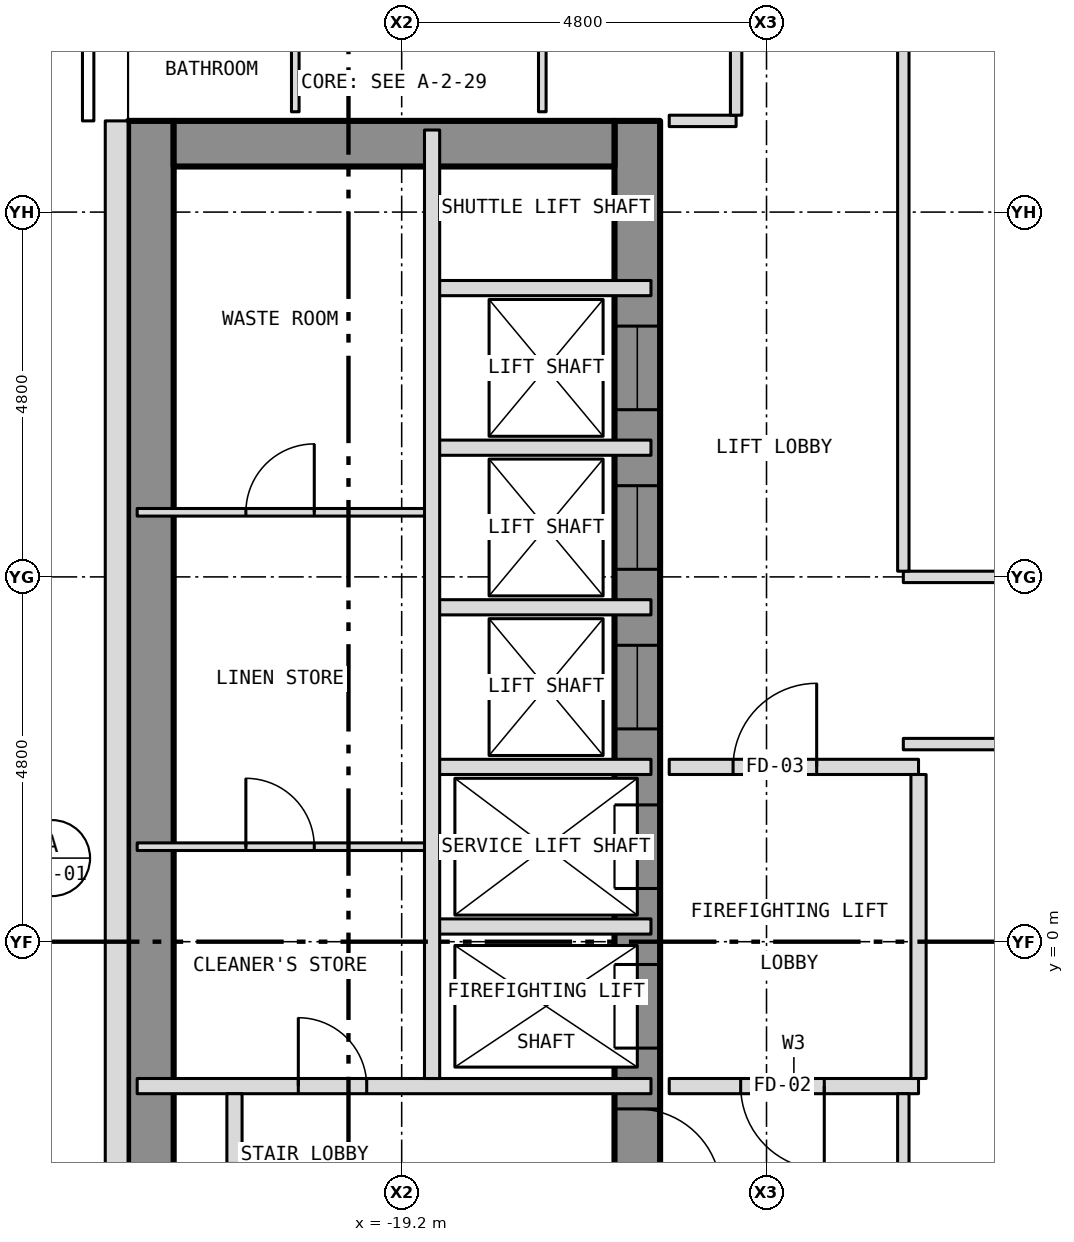
"""IFC4 building model, lengths in metres.
Left out: names, types, materials, properties, quantities, classifications, styles, units other than length and angle.
Written with IfcOpenShell. Run it as: python <this file> out.ifc"""

import sys

from ifc_helpers import new_model, si_unit, direction, frame, frame_2d, origin, place, context, subcontext, project, spatial, rectangle, extrude, element, fill, save


model = new_model("IFC4")
c1 = context("Model", 3, precision=1e-05, world=origin(), true_north=direction((0.0, 1.0)))
c2 = subcontext(c1, "Body", "Model", "MODEL_VIEW")
j1 = project(units=[si_unit("LENGTHUNIT", "METRE"), si_unit("PLANEANGLEUNIT", "RADIAN")], contexts=[c1])
p1 = place(None, origin())
s1 = spatial("IfcSite", under=j1, at=p1, CompositionType="ELEMENT")
p2 = place(p1, origin())
s2 = spatial("IfcBuilding", under=s1, at=p2, CompositionType="ELEMENT")
p3 = place(p2, frame((0.0, 0.0, 106.5)))
s3 = spatial("IfcBuildingStorey", under=s2, at=p3, CompositionType="ELEMENT", Elevation=106.5)
p4 = place(p3, frame((-16.1, -10.8, 0.0), z_axis=(0.0, 0.0, 1.0), x_axis=(0.0, 1.0, 0.0)))
e1 = element("IfcWall", 1, at=p4, inside=s3, PredefinedType="SHEAR", context=c2, shape_type="SweptSolid", body=[
    extrude(rectangle(XDim=21.6, YDim=0.6, at=frame_2d((10.8, 0.0))), origin(), (0.0, 0.0, 1.0), 3.25),
])
p5 = place(p4, frame((9.4, 0.0, 0.0)))
e2 = element("IfcOpeningElement", 2, at=p5, cuts=e1, PredefinedType="OPENING", context=c2, shape_type="SweptSolid", body=[
    extrude(rectangle(XDim=1.1, YDim=2.1, at=frame_2d((0.55, 1.05))), frame((0.0, 0.312, 0.0), z_axis=(0.0, -1.0, 0.0), x_axis=(1.0, 0.0, 0.0)), (0.0, 0.0, 1.0), 0.624),
])
p6 = place(p4, frame((11.5, 0.0, 0.0)))
e3 = element("IfcOpeningElement", 3, at=p6, cuts=e1, PredefinedType="OPENING", context=c2, shape_type="SweptSolid", body=[
    extrude(rectangle(XDim=1.1, YDim=2.1, at=frame_2d((0.55, 1.05))), frame((0.0, 0.312, 0.0), z_axis=(0.0, -1.0, 0.0), x_axis=(1.0, 0.0, 0.0)), (0.0, 0.0, 1.0), 0.624),
])
p7 = place(p4, frame((13.6, 0.0, 0.0)))
e4 = element("IfcOpeningElement", 4, at=p7, cuts=e1, PredefinedType="OPENING", context=c2, shape_type="SweptSolid", body=[
    extrude(rectangle(XDim=1.1, YDim=2.1, at=frame_2d((0.55, 1.05))), frame((0.0, 0.312, 0.0), z_axis=(0.0, -1.0, 0.0), x_axis=(1.0, 0.0, 0.0)), (0.0, 0.0, 1.0), 0.624),
])
p8 = place(p4, frame((15.7, 0.0, 0.0)))
e5 = element("IfcOpeningElement", 5, at=p8, cuts=e1, PredefinedType="OPENING", context=c2, shape_type="SweptSolid", body=[
    extrude(rectangle(XDim=1.1, YDim=2.1, at=frame_2d((0.55, 1.05))), frame((0.0, 0.312, 0.0), z_axis=(0.0, -1.0, 0.0), x_axis=(1.0, 0.0, 0.0)), (0.0, 0.0, 1.0), 0.624),
])
p9 = place(p4, frame((17.8, 0.0, 0.0)))
e6 = element("IfcOpeningElement", 6, at=p9, cuts=e1, PredefinedType="OPENING", context=c2, shape_type="SweptSolid", body=[
    extrude(rectangle(XDim=1.1, YDim=2.1, at=frame_2d((0.55, 1.05))), frame((0.0, 0.312, 0.0), z_axis=(0.0, -1.0, 0.0), x_axis=(1.0, 0.0, 0.0)), (0.0, 0.0, 1.0), 0.624),
])
p10 = place(p4, frame((0.758, 0.0, 0.0)))
e7 = element("IfcOpeningElement", 7, at=p10, cuts=e1, PredefinedType="OPENING", context=c2, shape_type="SweptSolid", body=[
    extrude(rectangle(XDim=1.1, YDim=2.1, at=frame_2d((0.55, 1.05))), frame((0.0, 0.312, 0.0), z_axis=(0.0, -1.0, 0.0), x_axis=(1.0, 0.0, 0.0)), (0.0, 0.0, 1.0), 0.624),
])
p11 = place(p4, frame((7.5, 0.0, 0.0)))
e8 = element("IfcOpeningElement", 8, at=p11, cuts=e1, PredefinedType="OPENING", context=c2, shape_type="SweptSolid", body=[
    extrude(rectangle(XDim=1.1, YDim=2.1, at=frame_2d((0.55, 1.05))), frame((0.0, 0.312, 0.0), z_axis=(0.0, -1.0, 0.0), x_axis=(1.0, 0.0, 0.0)), (0.0, 0.0, 1.0), 0.624),
])
p12 = place(p3, frame((-22.5, -10.8, 0.0), z_axis=(0.0, 0.0, 1.0), x_axis=(0.0, 1.0, 0.0)))
e9 = element("IfcWall", 9, at=p12, inside=s3, PredefinedType="SHEAR", context=c2, shape_type="SweptSolid", body=[
    extrude(rectangle(XDim=21.6, YDim=0.6, at=frame_2d((10.8, 0.0))), origin(), (0.0, 0.0, 1.0), 3.25),
])
p13 = place(p3, frame((-22.2, 10.5, 0.0), z_axis=(0.0, 0.0, 1.0), x_axis=(1.0, 0.0, 0.0)))
e10 = element("IfcWall", 10, at=p13, inside=s3, PredefinedType="SHEAR", context=c2, shape_type="SweptSolid", body=[
    extrude(rectangle(XDim=5.8, YDim=0.6, at=frame_2d((2.9, 0.0))), origin(), (0.0, 0.0, 1.0), 3.25),
])
p14 = place(p3, frame((-22.95, 10.8, 0.0), z_axis=(0.0, 0.0, 1.0), x_axis=(0.0, -1.0, 0.0)))
e11 = element("IfcWall", 11, at=p14, inside=s3, PredefinedType="SOLIDWALL", context=c2, shape_type="SweptSolid", body=[
    extrude(rectangle(XDim=21.6, YDim=0.3, at=frame_2d((10.8, 0.0))), origin(), (0.0, 0.0, 1.0), 3.5),
])
p15 = place(p14, frame((18.05, 0.0, 1.0)))
e12 = element("IfcOpeningElement", 12, at=p15, cuts=e11, PredefinedType="OPENING", context=c2, shape_type="SweptSolid", body=[
    extrude(rectangle(XDim=0.6, YDim=1.5, at=frame_2d((0.3, 0.75))), frame((0.0, 0.162, 0.0), z_axis=(0.0, -1.0, 0.0), x_axis=(1.0, 0.0, 0.0)), (0.0, 0.0, 1.0), 0.324),
])
p16 = place(p3, frame((-22.68, -1.9, 0.0), z_axis=(0.0, 0.0, 1.0), x_axis=(1.0, 0.0, 0.0)))
e13 = element("IfcWall", 13, at=p16, inside=s3, PredefinedType="PARTITIONING", context=c2, shape_type="SweptSolid", body=[
    extrude(rectangle(XDim=6.76, YDim=0.2, at=frame_2d((3.38, 0.0))), origin(), (0.0, 0.0, 1.0), 3.25),
])
p17 = place(p16, frame((2.12, 0.0, 0.0)))
e14 = element("IfcOpeningElement", 14, at=p17, cuts=e13, PredefinedType="OPENING", context=c2, shape_type="SweptSolid", body=[
    extrude(rectangle(XDim=0.9, YDim=2.1, at=frame_2d((0.45, 1.05))), frame((0.0, 0.112, 0.0), z_axis=(0.0, -1.0, 0.0), x_axis=(1.0, 0.0, 0.0)), (0.0, 0.0, 1.0), 0.224),
])
p18 = place(p3, frame((-15.68, -1.9, 0.0), z_axis=(0.0, 0.0, 1.0), x_axis=(1.0, 0.0, 0.0)))
e15 = element("IfcWall", 15, at=p18, inside=s3, PredefinedType="PARTITIONING", context=c2, shape_type="SweptSolid", body=[
    extrude(rectangle(XDim=3.28, YDim=0.2, at=frame_2d((1.64, 0.0))), origin(), (0.0, 0.0, 1.0), 3.35),
])
p19 = place(p18, frame((0.94, 0.0, 0.0)))
e16 = element("IfcOpeningElement", 16, at=p19, cuts=e15, PredefinedType="OPENING", context=c2, shape_type="SweptSolid", body=[
    extrude(rectangle(XDim=1.1, YDim=2.1, at=frame_2d((0.55, 1.05))), frame((0.0, 0.112, 0.0), z_axis=(0.0, -1.0, 0.0), x_axis=(1.0, 0.0, 0.0)), (0.0, 0.0, 1.0), 0.224),
])
p20 = place(p3, frame((-18.8, 0.2, 0.0), z_axis=(0.0, 0.0, 1.0), x_axis=(1.0, 0.0, 0.0)))
e17 = element("IfcWall", 17, at=p20, inside=s3, PredefinedType="PARTITIONING", context=c2, shape_type="SweptSolid", body=[
    extrude(rectangle(XDim=2.88, YDim=0.2, at=frame_2d((1.44, 0.0))), origin(), (0.0, 0.0, 1.0), 3.25),
])
p21 = place(p3, frame((-22.68, 1.25, 0.0), z_axis=(0.0, 0.0, 1.0), x_axis=(1.0, 0.0, 0.0)))
e18 = element("IfcWall", 18, at=p21, inside=s3, PredefinedType="PARTITIONING", context=c2, shape_type="SweptSolid", body=[
    extrude(rectangle(XDim=3.88, YDim=0.1, at=frame_2d((1.94, 0.0))), origin(), (0.0, 0.0, 1.0), 3.25),
])
p22 = place(p21, frame((1.43, 0.0, 0.0)))
e19 = element("IfcOpeningElement", 19, at=p22, cuts=e18, PredefinedType="OPENING", context=c2, shape_type="SweptSolid", body=[
    extrude(rectangle(XDim=0.9, YDim=2.1, at=frame_2d((0.45, 1.05))), frame((0.0, 0.062, 0.0), z_axis=(0.0, -1.0, 0.0), x_axis=(1.0, 0.0, 0.0)), (0.0, 0.0, 1.0), 0.124),
])
p23 = place(p3, frame((-18.8, 2.3, 0.0), z_axis=(0.0, 0.0, 1.0), x_axis=(1.0, 0.0, 0.0)))
e20 = element("IfcWall", 20, at=p23, inside=s3, PredefinedType="PARTITIONING", context=c2, shape_type="SweptSolid", body=[
    extrude(rectangle(XDim=2.88, YDim=0.2, at=frame_2d((1.44, 0.0))), origin(), (0.0, 0.0, 1.0), 3.25),
])
p24 = place(p3, frame((-15.68, 2.3, 0.0), z_axis=(0.0, 0.0, 1.0), x_axis=(1.0, 0.0, 0.0)))
e21 = element("IfcWall", 21, at=p24, inside=s3, PredefinedType="PARTITIONING", context=c2, shape_type="SweptSolid", body=[
    extrude(rectangle(XDim=3.28, YDim=0.2, at=frame_2d((1.64, 0.0))), origin(), (0.0, 0.0, 1.0), 3.35),
])
p25 = place(p24, frame((0.84, 0.0, 0.0)))
e22 = element("IfcOpeningElement", 22, at=p25, cuts=e21, PredefinedType="OPENING", context=c2, shape_type="SweptSolid", body=[
    extrude(rectangle(XDim=1.1, YDim=2.1, at=frame_2d((0.55, 1.05))), frame((0.0, 0.112, 0.0), z_axis=(0.0, -1.0, 0.0), x_axis=(1.0, 0.0, 0.0)), (0.0, 0.0, 1.0), 0.224),
])
p26 = place(p3, frame((-12.6, 2.6, 0.0), z_axis=(0.0, 0.0, 1.0), x_axis=(1.0, 0.0, 0.0)))
e23 = element("IfcWall", 23, at=p26, inside=s3, PredefinedType="PARTITIONING", context=c2, shape_type="SweptSolid", body=[
    extrude(rectangle(XDim=16.7, YDim=0.15, at=frame_2d((8.35, 0.0))), origin(), (0.0, 0.0, 1.0), 3.35),
])
p27 = place(p26, frame((5.85, 0.0, 0.0)))
e24 = element("IfcOpeningElement", 24, at=p27, cuts=e23, PredefinedType="OPENING", context=c2, shape_type="SweptSolid", body=[
    extrude(rectangle(XDim=0.9, YDim=2.1, at=frame_2d((0.45, 1.05))), frame((0.0, 0.087, 0.0), z_axis=(0.0, -1.0, 0.0), x_axis=(1.0, 0.0, 0.0)), (0.0, 0.0, 1.0), 0.174),
])
p28 = place(p3, frame((-18.8, 4.4, 0.0), z_axis=(0.0, 0.0, 1.0), x_axis=(1.0, 0.0, 0.0)))
e25 = element("IfcWall", 25, at=p28, inside=s3, PredefinedType="PARTITIONING", context=c2, shape_type="SweptSolid", body=[
    extrude(rectangle(XDim=2.88, YDim=0.2, at=frame_2d((1.44, 0.0))), origin(), (0.0, 0.0, 1.0), 3.25),
])
p29 = place(p3, frame((-12.6, 4.8, 0.0), z_axis=(0.0, 0.0, 1.0), x_axis=(1.0, 0.0, 0.0)))
e26 = element("IfcWall", 26, at=p29, inside=s3, PredefinedType="PARTITIONING", context=c2, shape_type="SweptSolid", body=[
    extrude(rectangle(XDim=16.7, YDim=0.15, at=frame_2d((8.35, 0.0))), origin(), (0.0, 0.0, 1.0), 3.35),
])
p30 = place(p29, frame((14.2, 0.0, 0.0)))
e27 = element("IfcOpeningElement", 27, at=p30, cuts=e26, PredefinedType="OPENING", context=c2, shape_type="SweptSolid", body=[
    extrude(rectangle(XDim=0.9, YDim=2.1, at=frame_2d((0.45, 1.05))), frame((0.0, 0.087, 0.0), z_axis=(0.0, -1.0, 0.0), x_axis=(1.0, 0.0, 0.0)), (0.0, 0.0, 1.0), 0.174),
])
p31 = place(p3, frame((-22.68, 5.65, 0.0), z_axis=(0.0, 0.0, 1.0), x_axis=(1.0, 0.0, 0.0)))
e28 = element("IfcWall", 28, at=p31, inside=s3, PredefinedType="PARTITIONING", context=c2, shape_type="SweptSolid", body=[
    extrude(rectangle(XDim=3.88, YDim=0.1, at=frame_2d((1.94, 0.0))), origin(), (0.0, 0.0, 1.0), 3.25),
])
p32 = place(p31, frame((1.43, 0.0, 0.0)))
e29 = element("IfcOpeningElement", 29, at=p32, cuts=e28, PredefinedType="OPENING", context=c2, shape_type="SweptSolid", body=[
    extrude(rectangle(XDim=0.9, YDim=2.1, at=frame_2d((0.45, 1.05))), frame((0.0, 0.062, 0.0), z_axis=(0.0, -1.0, 0.0), x_axis=(1.0, 0.0, 0.0)), (0.0, 0.0, 1.0), 0.124),
])
for number, where, z_axis, x_axis in (
    (30, (-18.8, 6.5, 0.0), (0.0, 0.0, 1.0), (1.0, 0.0, 0.0)),
    (31, (-18.8, 8.6, 0.0), (0.0, 0.0, 1.0), (1.0, 0.0, 0.0)),
):
    element("IfcWall", number, at=place(p3, frame(where, z_axis=z_axis, x_axis=x_axis)), inside=s3, PredefinedType="PARTITIONING", context=c2, shape_type="SweptSolid", body=[
        extrude(rectangle(XDim=2.88, YDim=0.2, at=frame_2d((1.44, 0.0))), origin(), (0.0, 0.0, 1.0), 3.25),
    ])
p33 = place(p3, frame((-15.68, 10.8, 0.0), z_axis=(0.0, 0.0, 1.0), x_axis=(1.0, 0.0, 0.0)))
e32 = element("IfcWall", 32, at=p33, inside=s3, PredefinedType="PARTITIONING", context=c2, shape_type="SweptSolid", body=[
    extrude(rectangle(XDim=0.88, YDim=0.15, at=frame_2d((0.44, 0.0))), origin(), (0.0, 0.0, 1.0), 3.35),
])
p34 = place(p3, frame((-21.4, -10.68, 0.0), z_axis=(0.0, 0.0, 1.0), x_axis=(0.0, 1.0, 0.0)))
e33 = element("IfcWall", 33, at=p34, inside=s3, PredefinedType="PARTITIONING", context=c2, shape_type="SweptSolid", body=[
    extrude(rectangle(XDim=8.68, YDim=0.2, at=frame_2d((4.34, 0.0))), origin(), (0.0, 0.0, 1.0), 3.25),
])
p35 = place(p34, frame((0.899, 0.0, 0.0)))
e34 = element("IfcOpeningElement", 34, at=p35, cuts=e33, PredefinedType="OPENING", context=c2, shape_type="SweptSolid", body=[
    extrude(rectangle(XDim=0.9, YDim=2.1, at=frame_2d((0.45, 1.05))), frame((0.0, 0.112, 0.0), z_axis=(0.0, -1.0, 0.0), x_axis=(1.0, 0.0, 0.0)), (0.0, 0.0, 1.0), 0.224),
])
p36 = place(p34, frame((3.88, 0.0, 0.0)))
e35 = element("IfcOpeningElement", 35, at=p36, cuts=e33, PredefinedType="OPENING", context=c2, shape_type="SweptSolid", body=[
    extrude(rectangle(XDim=0.9, YDim=2.1, at=frame_2d((0.45, 1.05))), frame((0.0, 0.112, 0.0), z_axis=(0.0, -1.0, 0.0), x_axis=(1.0, 0.0, 0.0)), (0.0, 0.0, 1.0), 0.224),
])
p37 = place(p34, frame((6.862, 0.0, 0.0)))
e36 = element("IfcOpeningElement", 36, at=p37, cuts=e33, PredefinedType="OPENING", context=c2, shape_type="SweptSolid", body=[
    extrude(rectangle(XDim=0.9, YDim=2.1, at=frame_2d((0.45, 1.05))), frame((0.0, 0.112, 0.0), z_axis=(0.0, -1.0, 0.0), x_axis=(1.0, 0.0, 0.0)), (0.0, 0.0, 1.0), 0.224),
])
p38 = place(p3, frame((-20.6, 10.92, 0.0), z_axis=(0.0, 0.0, 1.0), x_axis=(0.0, 1.0, 0.0)))
e37 = element("IfcWall", 37, at=p38, inside=s3, PredefinedType="PARTITIONING", context=c2, shape_type="SweptSolid", body=[
    extrude(rectangle(XDim=3.03, YDim=0.1, at=frame_2d((1.515, 0.0))), origin(), (0.0, 0.0, 1.0), 3.35),
])
p39 = place(p38, frame((1.67, 0.0, 0.0)))
e38 = element("IfcOpeningElement", 38, at=p39, cuts=e37, PredefinedType="OPENING", context=c2, shape_type="SweptSolid", body=[
    extrude(rectangle(XDim=0.9, YDim=2.1, at=frame_2d((0.45, 1.05))), frame((0.0, 0.062, 0.0), z_axis=(0.0, -1.0, 0.0), x_axis=(1.0, 0.0, 0.0)), (0.0, 0.0, 1.0), 0.124),
])
p40 = place(p3, frame((-18.8, -1.8, 0.0), z_axis=(0.0, 0.0, 1.0), x_axis=(0.0, 1.0, 0.0)))
e39 = element("IfcWall", 39, at=p40, inside=s3, PredefinedType="PARTITIONING", context=c2, shape_type="SweptSolid", body=[
    extrude(rectangle(XDim=12.48, YDim=0.2, at=frame_2d((6.24, 0.0))), origin(), (0.0, 0.0, 1.0), 3.25),
])
p41 = place(p3, frame((-17.35, 10.92, 0.0), z_axis=(0.0, 0.0, 1.0), x_axis=(0.0, 1.0, 0.0)))
e40 = element("IfcWall", 40, at=p41, inside=s3, PredefinedType="PARTITIONING", context=c2, shape_type="SweptSolid", body=[
    extrude(rectangle(XDim=12.36, YDim=0.1, at=frame_2d((6.18, 0.0))), origin(), (0.0, 0.0, 1.0), 3.35),
])
p42 = place(p41, frame((5.43, 0.0, 0.0)))
e41 = element("IfcOpeningElement", 41, at=p42, cuts=e40, PredefinedType="OPENING", context=c2, shape_type="SweptSolid", body=[
    extrude(rectangle(XDim=0.9, YDim=2.1, at=frame_2d((0.45, 1.05))), frame((0.0, 0.062, 0.0), z_axis=(0.0, -1.0, 0.0), x_axis=(1.0, 0.0, 0.0)), (0.0, 0.0, 1.0), 0.124),
])
p43 = place(p3, frame((-14.8, 10.875, 0.0), z_axis=(0.0, 0.0, 1.0), x_axis=(0.0, 1.0, 0.0)))
e42 = element("IfcWall", 42, at=p43, inside=s3, PredefinedType="PARTITIONING", context=c2, shape_type="SweptSolid", body=[
    extrude(rectangle(XDim=3.85, YDim=0.15, at=frame_2d((1.925, 0.0))), origin(), (0.0, 0.0, 1.0), 3.35),
])
p44 = place(p43, frame((2.325, 0.0, 0.0)))
e43 = element("IfcOpeningElement", 43, at=p44, cuts=e42, PredefinedType="OPENING", context=c2, shape_type="SweptSolid", body=[
    extrude(rectangle(XDim=1.0, YDim=2.1, at=frame_2d((0.5, 1.05))), frame((0.0, 0.087, 0.0), z_axis=(0.0, -1.0, 0.0), x_axis=(1.0, 0.0, 0.0)), (0.0, 0.0, 1.0), 0.174),
])
p45 = place(p3, frame((-12.6, -12.525, 0.0), z_axis=(0.0, 0.0, 1.0), x_axis=(0.0, 1.0, 0.0)))
e44 = element("IfcWall", 44, at=p45, inside=s3, PredefinedType="PARTITIONING", context=c2, shape_type="SweptSolid", body=[
    extrude(rectangle(XDim=10.525, YDim=0.15, at=frame_2d((5.262, 0.0))), origin(), (0.0, 0.0, 1.0), 3.35),
])
p46 = place(p3, frame((-12.6, 4.875, 0.0), z_axis=(0.0, 0.0, 1.0), x_axis=(0.0, 1.0, 0.0)))
e45 = element("IfcWall", 45, at=p46, inside=s3, PredefinedType="PARTITIONING", context=c2, shape_type="SweptSolid", body=[
    extrude(rectangle(XDim=7.65, YDim=0.15, at=frame_2d((3.825, 0.0))), origin(), (0.0, 0.0, 1.0), 3.35),
])
p47 = place(p3, frame((-12.4, -1.8, 0.0), z_axis=(0.0, 0.0, 1.0), x_axis=(0.0, 1.0, 0.0)))
e46 = element("IfcWall", 46, at=p47, inside=s3, PredefinedType="PARTITIONING", context=c2, shape_type="SweptSolid", body=[
    extrude(rectangle(XDim=4.0, YDim=0.2, at=frame_2d((2.0, 0.0))), origin(), (0.0, 0.0, 1.0), 3.35),
])
p48 = place(p5, origin())
e47 = element("IfcDoor", 47, at=p48, inside=s3, OperationType="SLIDING_TO_LEFT", PredefinedType="DOOR", context=c2, shape_type="SweptSolid", body=[
    extrude(rectangle(XDim=1.1, YDim=2.1, at=frame_2d((0.55, 1.05))), frame((0.0, 0.025, 0.0), z_axis=(0.0, -1.0, 0.0), x_axis=(1.0, 0.0, 0.0)), (0.0, 0.0, 1.0), 0.05),
])
fill(e2, e47)
p49 = place(p6, origin())
e48 = element("IfcDoor", 48, at=p49, inside=s3, OperationType="SLIDING_TO_LEFT", PredefinedType="DOOR", context=c2, shape_type="SweptSolid", body=[
    extrude(rectangle(XDim=1.1, YDim=2.1, at=frame_2d((0.55, 1.05))), frame((0.0, 0.025, 0.0), z_axis=(0.0, -1.0, 0.0), x_axis=(1.0, 0.0, 0.0)), (0.0, 0.0, 1.0), 0.05),
])
fill(e3, e48)
p50 = place(p7, origin())
e49 = element("IfcDoor", 49, at=p50, inside=s3, OperationType="SLIDING_TO_LEFT", PredefinedType="DOOR", context=c2, shape_type="SweptSolid", body=[
    extrude(rectangle(XDim=1.1, YDim=2.1, at=frame_2d((0.55, 1.05))), frame((0.0, 0.025, 0.0), z_axis=(0.0, -1.0, 0.0), x_axis=(1.0, 0.0, 0.0)), (0.0, 0.0, 1.0), 0.05),
])
fill(e4, e49)
p51 = place(p8, origin())
e50 = element("IfcDoor", 50, at=p51, inside=s3, OperationType="SLIDING_TO_LEFT", PredefinedType="DOOR", context=c2, shape_type="SweptSolid", body=[
    extrude(rectangle(XDim=1.1, YDim=2.1, at=frame_2d((0.55, 1.05))), frame((0.0, 0.025, 0.0), z_axis=(0.0, -1.0, 0.0), x_axis=(1.0, 0.0, 0.0)), (0.0, 0.0, 1.0), 0.05),
])
fill(e5, e50)
p52 = place(p9, origin())
e51 = element("IfcDoor", 51, at=p52, inside=s3, OperationType="SLIDING_TO_LEFT", PredefinedType="DOOR", context=c2, shape_type="SweptSolid", body=[
    extrude(rectangle(XDim=1.1, YDim=2.1, at=frame_2d((0.55, 1.05))), frame((0.0, 0.025, 0.0), z_axis=(0.0, -1.0, 0.0), x_axis=(1.0, 0.0, 0.0)), (0.0, 0.0, 1.0), 0.05),
])
fill(e6, e51)
p53 = place(p11, origin())
e52 = element("IfcDoor", 52, at=p53, inside=s3, OperationType="SINGLE_SWING_LEFT", PredefinedType="DOOR", context=c2, shape_type="SweptSolid", body=[
    extrude(rectangle(XDim=1.1, YDim=2.1, at=frame_2d((0.55, 1.05))), frame((0.0, 0.025, 0.0), z_axis=(0.0, -1.0, 0.0), x_axis=(1.0, 0.0, 0.0)), (0.0, 0.0, 1.0), 0.05),
])
fill(e8, e52)
p54 = place(p17, origin())
e53 = element("IfcDoor", 53, at=p54, inside=s3, OperationType="SINGLE_SWING_LEFT", PredefinedType="DOOR", context=c2, shape_type="SweptSolid", body=[
    extrude(rectangle(XDim=0.9, YDim=2.1, at=frame_2d((0.45, 1.05))), frame((0.0, 0.025, 0.0), z_axis=(0.0, -1.0, 0.0), x_axis=(1.0, 0.0, 0.0)), (0.0, 0.0, 1.0), 0.05),
])
fill(e14, e53)
p55 = place(p22, origin())
e54 = element("IfcDoor", 54, at=p55, inside=s3, OperationType="SINGLE_SWING_LEFT", PredefinedType="DOOR", context=c2, shape_type="SweptSolid", body=[
    extrude(rectangle(XDim=0.9, YDim=2.1, at=frame_2d((0.45, 1.05))), frame((0.0, 0.025, 0.0), z_axis=(0.0, -1.0, 0.0), x_axis=(1.0, 0.0, 0.0)), (0.0, 0.0, 1.0), 0.05),
])
fill(e19, e54)
p56 = place(p32, origin())
e55 = element("IfcDoor", 55, at=p56, inside=s3, OperationType="SINGLE_SWING_RIGHT", PredefinedType="DOOR", context=c2, shape_type="SweptSolid", body=[
    extrude(rectangle(XDim=0.9, YDim=2.1, at=frame_2d((0.45, 1.05))), frame((0.0, 0.025, 0.0), z_axis=(0.0, -1.0, 0.0), x_axis=(1.0, 0.0, 0.0)), (0.0, 0.0, 1.0), 0.05),
])
fill(e29, e55)
p57 = place(p19, origin())
e56 = element("IfcDoor", 56, at=p57, inside=s3, OperationType="SINGLE_SWING_RIGHT", PredefinedType="DOOR", context=c2, shape_type="SweptSolid", body=[
    extrude(rectangle(XDim=1.1, YDim=2.1, at=frame_2d((0.55, 1.05))), frame((0.0, 0.025, 0.0), z_axis=(0.0, -1.0, 0.0), x_axis=(1.0, 0.0, 0.0)), (0.0, 0.0, 1.0), 0.05),
])
fill(e16, e56)
p58 = place(p25, origin())
e57 = element("IfcDoor", 57, at=p58, inside=s3, OperationType="SINGLE_SWING_RIGHT", PredefinedType="DOOR", context=c2, shape_type="SweptSolid", body=[
    extrude(rectangle(XDim=1.1, YDim=2.1, at=frame_2d((0.55, 1.05))), frame((0.0, 0.025, 0.0), z_axis=(0.0, -1.0, 0.0), x_axis=(1.0, 0.0, 0.0)), (0.0, 0.0, 1.0), 0.05),
])
fill(e22, e57)
save(model, sys.argv[1])
